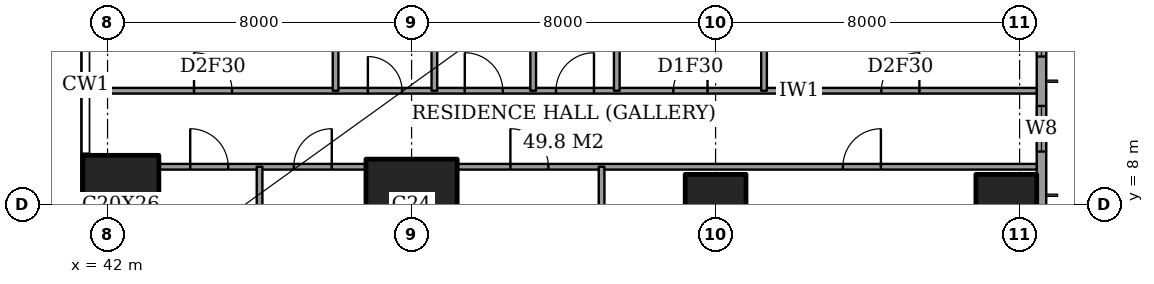
"""IFC4 building model, lengths in metres.
Left out: names, types, materials, properties, quantities, classifications, styles, units other than length and angle.
Written with IfcOpenShell. Run it as: python <this file> out.ifc"""

import sys

from ifc_helpers import new_model, si_unit, direction, frame, frame_2d, origin, origin_2d, place, context, subcontext, project, spatial, rectangle, extrude, element, fill, save


model = new_model("IFC4")
c1 = context("Model", 3, precision=1e-05, world=origin(), true_north=direction((0.0, 1.0)))
c2 = subcontext(c1, "Body", "Model", "MODEL_VIEW")
j1 = project(units=[si_unit("LENGTHUNIT", "METRE"), si_unit("PLANEANGLEUNIT", "RADIAN")], contexts=[c1])
p1 = place(None, origin())
s1 = spatial("IfcSite", under=j1, at=p1, CompositionType="ELEMENT")
p2 = place(p1, origin())
s2 = spatial("IfcBuilding", under=s1, at=p2, CompositionType="ELEMENT")
p3 = place(p2, frame((0.0, 0.0, 230.4)))
s3 = spatial("IfcBuildingStorey", under=s2, at=p3, CompositionType="ELEMENT", Elevation=230.4)
p4 = place(p3, frame((42.35, 8.0, 0.0), z_axis=(0.0, 0.0, 1.0), x_axis=(1.0, 0.0, 0.0)))
e1 = element("IfcColumn", 1, at=p4, inside=s3, PredefinedType="COLUMN", context=c2, shape_type="SweptSolid", body=[
    extrude(rectangle(XDim=2.0, YDim=2.6, at=origin_2d()), origin(), (0.0, 0.0, 1.0), 3.6),
])
p5 = place(p3, frame((50.0, 8.0, 0.0), z_axis=(0.0, 0.0, 1.0), x_axis=(1.0, 0.0, 0.0)))
e2 = element("IfcColumn", 2, at=p5, inside=s3, PredefinedType="COLUMN", context=c2, shape_type="SweptSolid", body=[
    extrude(rectangle(XDim=2.4, YDim=2.4, at=origin_2d()), origin(), (0.0, 0.0, 1.0), 3.6),
])
for number, where, z_axis, x_axis in (
    (3, (58.0, 8.0, 0.0), (0.0, 0.0, 1.0), (1.0, 0.0, 0.0)),
    (4, (65.65, 8.0, 0.0), (0.0, 0.0, 1.0), (1.0, 0.0, 0.0)),
):
    element("IfcColumn", number, at=place(p3, frame(where, z_axis=z_axis, x_axis=x_axis)), inside=s3, PredefinedType="COLUMN", context=c2, shape_type="SweptSolid", body=[
        extrude(rectangle(XDim=1.6, YDim=1.6, at=origin_2d()), origin(), (0.0, 0.0, 1.0), 3.6),
    ])
p6 = place(p3, frame((66.575, 3.175, 0.0), z_axis=(0.0, 0.0, 1.0), x_axis=(0.0, 1.0, 0.0)))
e5 = element("IfcWall", 5, at=p6, inside=s3, PredefinedType="SOLIDWALL", context=c2, shape_type="SweptSolid", body=[
    extrude(rectangle(XDim=41.65, YDim=0.25, at=frame_2d((20.825, 0.0))), origin(), (0.0, 0.0, 1.0), 3.6),
])
p7 = place(p6, frame((0.875, 0.0, 0.6)))
e6 = element("IfcOpeningElement", 6, at=p7, cuts=e5, PredefinedType="OPENING", context=c2, shape_type="SweptSolid", body=[
    extrude(rectangle(XDim=2.4, YDim=2.0, at=frame_2d((1.2, 1.0))), frame((0.0, 0.135, 0.0), z_axis=(0.0, -1.0, 0.0), x_axis=(1.0, 0.0, 0.0)), (0.0, 0.0, 1.0), 0.27),
])
p8 = place(p6, frame((6.225, 0.0, 0.6)))
e7 = element("IfcOpeningElement", 7, at=p8, cuts=e5, PredefinedType="OPENING", context=c2, shape_type="SweptSolid", body=[
    extrude(rectangle(XDim=1.2, YDim=2.0, at=frame_2d((0.6, 1.0))), frame((0.0, 0.135, 0.0), z_axis=(0.0, -1.0, 0.0), x_axis=(1.0, 0.0, 0.0)), (0.0, 0.0, 1.0), 0.27),
])
p9 = place(p6, frame((8.725, 0.0, 0.6)))
e8 = element("IfcOpeningElement", 8, at=p9, cuts=e5, PredefinedType="OPENING", context=c2, shape_type="SweptSolid", body=[
    extrude(rectangle(XDim=2.4, YDim=2.0, at=frame_2d((1.2, 1.0))), frame((0.0, 0.135, 0.0), z_axis=(0.0, -1.0, 0.0), x_axis=(1.0, 0.0, 0.0)), (0.0, 0.0, 1.0), 0.27),
])
p10 = place(p6, frame((15.725, 0.0, 0.6)))
e9 = element("IfcOpeningElement", 9, at=p10, cuts=e5, PredefinedType="OPENING", context=c2, shape_type="SweptSolid", body=[
    extrude(rectangle(XDim=2.4, YDim=2.0, at=frame_2d((1.2, 1.0))), frame((0.0, 0.135, 0.0), z_axis=(0.0, -1.0, 0.0), x_axis=(1.0, 0.0, 0.0)), (0.0, 0.0, 1.0), 0.27),
])
p11 = place(p6, frame((23.525, 0.0, 0.6)))
e10 = element("IfcOpeningElement", 10, at=p11, cuts=e5, PredefinedType="OPENING", context=c2, shape_type="SweptSolid", body=[
    extrude(rectangle(XDim=2.4, YDim=2.0, at=frame_2d((1.2, 1.0))), frame((0.0, 0.135, 0.0), z_axis=(0.0, -1.0, 0.0), x_axis=(1.0, 0.0, 0.0)), (0.0, 0.0, 1.0), 0.27),
])
p12 = place(p6, frame((30.725, 0.0, 0.6)))
e11 = element("IfcOpeningElement", 11, at=p12, cuts=e5, PredefinedType="OPENING", context=c2, shape_type="SweptSolid", body=[
    extrude(rectangle(XDim=2.4, YDim=2.0, at=frame_2d((1.2, 1.0))), frame((0.0, 0.135, 0.0), z_axis=(0.0, -1.0, 0.0), x_axis=(1.0, 0.0, 0.0)), (0.0, 0.0, 1.0), 0.27),
])
p13 = place(p6, frame((34.525, 0.0, 0.6)))
e12 = element("IfcOpeningElement", 12, at=p13, cuts=e5, PredefinedType="OPENING", context=c2, shape_type="SweptSolid", body=[
    extrude(rectangle(XDim=1.2, YDim=2.0, at=frame_2d((0.6, 1.0))), frame((0.0, 0.135, 0.0), z_axis=(0.0, -1.0, 0.0), x_axis=(1.0, 0.0, 0.0)), (0.0, 0.0, 1.0), 0.27),
])
p14 = place(p6, frame((38.375, 0.0, 0.6)))
e13 = element("IfcOpeningElement", 13, at=p14, cuts=e5, PredefinedType="OPENING", context=c2, shape_type="SweptSolid", body=[
    extrude(rectangle(XDim=2.4, YDim=2.0, at=frame_2d((1.2, 1.0))), frame((0.0, 0.135, 0.0), z_axis=(0.0, -1.0, 0.0), x_axis=(1.0, 0.0, 0.0)), (0.0, 0.0, 1.0), 0.27),
])
p15 = place(p3, frame((43.35, 9.0, 0.0), z_axis=(0.0, 0.0, 1.0), x_axis=(1.0, 0.0, 0.0)))
e14 = element("IfcWall", 14, at=p15, inside=s3, PredefinedType="PARTITIONING", context=c2, shape_type="SweptSolid", body=[
    extrude(rectangle(XDim=5.45, YDim=0.15, at=frame_2d((2.725, 0.0))), origin(), (0.0, 0.0, 1.0), 3.35),
])
p16 = place(p15, frame((3.55, 0.0, 0.0)))
e15 = element("IfcOpeningElement", 15, at=p16, cuts=e14, PredefinedType="OPENING", context=c2, shape_type="SweptSolid", body=[
    extrude(rectangle(XDim=1.0, YDim=2.1, at=frame_2d((0.5, 1.05))), frame((0.0, 0.085, 0.0), z_axis=(0.0, -1.0, 0.0), x_axis=(1.0, 0.0, 0.0)), (0.0, 0.0, 1.0), 0.17),
])
p17 = place(p15, frame((0.825, 0.0, 0.0)))
e16 = element("IfcOpeningElement", 16, at=p17, cuts=e14, PredefinedType="OPENING", context=c2, shape_type="SweptSolid", body=[
    extrude(rectangle(XDim=1.0, YDim=2.1, at=frame_2d((0.5, 1.05))), frame((0.0, 0.085, 0.0), z_axis=(0.0, -1.0, 0.0), x_axis=(1.0, 0.0, 0.0)), (0.0, 0.0, 1.0), 0.17),
])
p18 = place(p3, frame((51.2, 9.0, 0.0), z_axis=(0.0, 0.0, 1.0), x_axis=(1.0, 0.0, 0.0)))
e17 = element("IfcWall", 17, at=p18, inside=s3, PredefinedType="PARTITIONING", context=c2, shape_type="SweptSolid", body=[
    extrude(rectangle(XDim=15.25, YDim=0.15, at=frame_2d((7.625, 0.0))), origin(), (0.0, 0.0, 1.0), 3.35),
])
p19 = place(p18, frame((10.15, 0.0, 0.0)))
e18 = element("IfcOpeningElement", 18, at=p19, cuts=e17, PredefinedType="OPENING", context=c2, shape_type="SweptSolid", body=[
    extrude(rectangle(XDim=1.0, YDim=2.1, at=frame_2d((0.5, 1.05))), frame((0.0, 0.085, 0.0), z_axis=(0.0, -1.0, 0.0), x_axis=(1.0, 0.0, 0.0)), (0.0, 0.0, 1.0), 0.17),
])
p20 = place(p18, frame((1.4, 0.0, 0.0)))
e19 = element("IfcOpeningElement", 19, at=p20, cuts=e17, PredefinedType="OPENING", context=c2, shape_type="SweptSolid", body=[
    extrude(rectangle(XDim=1.0, YDim=2.1, at=frame_2d((0.5, 1.05))), frame((0.0, 0.085, 0.0), z_axis=(0.0, -1.0, 0.0), x_axis=(1.0, 0.0, 0.0)), (0.0, 0.0, 1.0), 0.17),
])
p21 = place(p3, frame((41.439, 11.0, 0.0), z_axis=(0.0, 0.0, 1.0), x_axis=(1.0, 0.0, 0.0)))
e20 = element("IfcWall", 20, at=p21, inside=s3, PredefinedType="PARTITIONING", context=c2, shape_type="SweptSolid", body=[
    extrude(rectangle(XDim=25.011, YDim=0.15, at=frame_2d((12.505, 0.0))), origin(), (0.0, 0.0, 1.0), 3.35),
])
p22 = place(p21, frame((12.361, 0.0, 0.0)))
e21 = element("IfcOpeningElement", 21, at=p22, cuts=e20, PredefinedType="OPENING", context=c2, shape_type="SweptSolid", body=[
    extrude(rectangle(XDim=1.0, YDim=2.1, at=frame_2d((0.5, 1.05))), frame((0.0, 0.085, 0.0), z_axis=(0.0, -1.0, 0.0), x_axis=(1.0, 0.0, 0.0)), (0.0, 0.0, 1.0), 0.17),
])
p23 = place(p21, frame((20.924, 0.0, 0.0)))
e22 = element("IfcOpeningElement", 22, at=p23, cuts=e20, PredefinedType="OPENING", context=c2, shape_type="SweptSolid", body=[
    extrude(rectangle(XDim=1.0, YDim=2.1, at=frame_2d((0.5, 1.05))), frame((0.0, 0.085, 0.0), z_axis=(0.0, -1.0, 0.0), x_axis=(1.0, 0.0, 0.0)), (0.0, 0.0, 1.0), 0.17),
])
p24 = place(p21, frame((15.448, 0.0, 0.0)))
e23 = element("IfcOpeningElement", 23, at=p24, cuts=e20, PredefinedType="OPENING", context=c2, shape_type="SweptSolid", body=[
    extrude(rectangle(XDim=0.9, YDim=2.1, at=frame_2d((0.45, 1.05))), frame((0.0, 0.085, 0.0), z_axis=(0.0, -1.0, 0.0), x_axis=(1.0, 0.0, 0.0)), (0.0, 0.0, 1.0), 0.17),
])
p25 = place(p21, frame((9.961, 0.0, 0.0)))
e24 = element("IfcOpeningElement", 24, at=p25, cuts=e20, PredefinedType="OPENING", context=c2, shape_type="SweptSolid", body=[
    extrude(rectangle(XDim=1.0, YDim=2.1, at=frame_2d((0.5, 1.05))), frame((0.0, 0.085, 0.0), z_axis=(0.0, -1.0, 0.0), x_axis=(1.0, 0.0, 0.0)), (0.0, 0.0, 1.0), 0.17),
])
p26 = place(p21, frame((7.411, 0.0, 0.0)))
e25 = element("IfcOpeningElement", 25, at=p26, cuts=e20, PredefinedType="OPENING", context=c2, shape_type="SweptSolid", body=[
    extrude(rectangle(XDim=0.9, YDim=2.1, at=frame_2d((0.45, 1.05))), frame((0.0, 0.085, 0.0), z_axis=(0.0, -1.0, 0.0), x_axis=(1.0, 0.0, 0.0)), (0.0, 0.0, 1.0), 0.17),
])
p27 = place(p21, frame((2.836, 0.0, 0.0)))
e26 = element("IfcOpeningElement", 26, at=p27, cuts=e20, PredefinedType="OPENING", context=c2, shape_type="SweptSolid", body=[
    extrude(rectangle(XDim=1.0, YDim=2.1, at=frame_2d((0.5, 1.05))), frame((0.0, 0.085, 0.0), z_axis=(0.0, -1.0, 0.0), x_axis=(1.0, 0.0, 0.0)), (0.0, 0.0, 1.0), 0.17),
])
p28 = place(p3, frame((46.0, -0.45, 0.0), z_axis=(0.0, 0.0, 1.0), x_axis=(0.0, 1.0, 0.0)))
e27 = element("IfcWall", 27, at=p28, inside=s3, PredefinedType="PARTITIONING", context=c2, shape_type="SweptSolid", body=[
    extrude(rectangle(XDim=9.45, YDim=0.15, at=frame_2d((4.725, 0.0))), origin(), (0.0, 0.0, 1.0), 3.35),
])
p29 = place(p3, frame((48.0, 11.0, 0.0), z_axis=(0.0, 0.0, 1.0), x_axis=(0.0, 1.0, 0.0)))
e28 = element("IfcWall", 28, at=p29, inside=s3, PredefinedType="PARTITIONING", context=c2, shape_type="SweptSolid", body=[
    extrude(rectangle(XDim=6.5, YDim=0.15, at=frame_2d((3.25, 0.0))), origin(), (0.0, 0.0, 1.0), 3.35),
])
p30 = place(p3, frame((50.6, 11.0, 0.0), z_axis=(0.0, 0.0, 1.0), x_axis=(0.0, 1.0, 0.0)))
e29 = element("IfcWall", 29, at=p30, inside=s3, PredefinedType="PARTITIONING", context=c2, shape_type="SweptSolid", body=[
    extrude(rectangle(XDim=3.8, YDim=0.15, at=frame_2d((1.9, 0.0))), origin(), (0.0, 0.0, 1.0), 3.35),
])
p31 = place(p3, frame((53.2, 11.0, 0.0), z_axis=(0.0, 0.0, 1.0), x_axis=(0.0, 1.0, 0.0)))
e30 = element("IfcWall", 30, at=p31, inside=s3, PredefinedType="PARTITIONING", context=c2, shape_type="SweptSolid", body=[
    extrude(rectangle(XDim=6.5, YDim=0.15, at=frame_2d((3.25, 0.0))), origin(), (0.0, 0.0, 1.0), 3.35),
])
p32 = place(p3, frame((55.0, -0.45, 0.0), z_axis=(0.0, 0.0, 1.0), x_axis=(0.0, 1.0, 0.0)))
e31 = element("IfcWall", 31, at=p32, inside=s3, PredefinedType="PARTITIONING", context=c2, shape_type="SweptSolid", body=[
    extrude(rectangle(XDim=9.45, YDim=0.15, at=frame_2d((4.725, 0.0))), origin(), (0.0, 0.0, 1.0), 3.35),
])
p33 = place(p3, frame((55.4, 11.0, 0.0), z_axis=(0.0, 0.0, 1.0), x_axis=(0.0, 1.0, 0.0)))
e32 = element("IfcWall", 32, at=p33, inside=s3, PredefinedType="PARTITIONING", context=c2, shape_type="SweptSolid", body=[
    extrude(rectangle(XDim=10.6, YDim=0.15, at=frame_2d((5.3, 0.0))), origin(), (0.0, 0.0, 1.0), 3.35),
])
p34 = place(p33, frame((8.05, 0.0, 0.0)))
e33 = element("IfcOpeningElement", 33, at=p34, cuts=e32, PredefinedType="OPENING", context=c2, shape_type="SweptSolid", body=[
    extrude(rectangle(XDim=1.0, YDim=2.1, at=frame_2d((0.5, 1.05))), frame((0.0, 0.085, 0.0), z_axis=(0.0, -1.0, 0.0), x_axis=(1.0, 0.0, 0.0)), (0.0, 0.0, 1.0), 0.17),
])
p35 = place(p3, frame((59.275, 11.0, 0.0), z_axis=(0.0, 0.0, 1.0), x_axis=(0.0, 1.0, 0.0)))
e34 = element("IfcWall", 34, at=p35, inside=s3, PredefinedType="PARTITIONING", context=c2, shape_type="SweptSolid", body=[
    extrude(rectangle(XDim=3.8, YDim=0.15, at=frame_2d((1.9, 0.0))), origin(), (0.0, 0.0, 1.0), 3.35),
])
p36 = place(p8, origin())
e35 = element("IfcWindow", 35, at=p36, inside=s3, PartitioningType="SINGLE_PANEL", PredefinedType="WINDOW", context=c2, shape_type="SweptSolid", body=[
    extrude(rectangle(XDim=1.2, YDim=2.0, at=frame_2d((0.6, 1.0))), frame((0.0, 0.03, 0.0), z_axis=(0.0, -1.0, 0.0), x_axis=(1.0, 0.0, 0.0)), (0.0, 0.0, 1.0), 0.06),
])
fill(e7, e35)
p37 = place(p9, origin())
e36 = element("IfcWindow", 36, at=p37, inside=s3, PartitioningType="SINGLE_PANEL", PredefinedType="WINDOW", context=c2, shape_type="SweptSolid", body=[
    extrude(rectangle(XDim=2.4, YDim=2.0, at=frame_2d((1.2, 1.0))), frame((0.0, 0.03, 0.0), z_axis=(0.0, -1.0, 0.0), x_axis=(1.0, 0.0, 0.0)), (0.0, 0.0, 1.0), 0.06),
])
fill(e8, e36)
p38 = place(p19, origin())
e37 = element("IfcDoor", 37, at=p38, inside=s3, OperationType="SINGLE_SWING_LEFT", PredefinedType="DOOR", context=c2, shape_type="SweptSolid", body=[
    extrude(rectangle(XDim=1.0, YDim=2.1, at=frame_2d((0.5, 1.05))), frame((0.0, 0.025, 0.0), z_axis=(0.0, -1.0, 0.0), x_axis=(1.0, 0.0, 0.0)), (0.0, 0.0, 1.0), 0.05),
])
fill(e18, e37)
p39 = place(p20, origin())
e38 = element("IfcDoor", 38, at=p39, inside=s3, OperationType="SINGLE_SWING_RIGHT", PredefinedType="DOOR", context=c2, shape_type="SweptSolid", body=[
    extrude(rectangle(XDim=1.0, YDim=2.1, at=frame_2d((0.5, 1.05))), frame((0.0, 0.025, 0.0), z_axis=(0.0, -1.0, 0.0), x_axis=(1.0, 0.0, 0.0)), (0.0, 0.0, 1.0), 0.05),
])
fill(e19, e38)
p40 = place(p16, origin())
e39 = element("IfcDoor", 39, at=p40, inside=s3, OperationType="SINGLE_SWING_LEFT", PredefinedType="DOOR", context=c2, shape_type="SweptSolid", body=[
    extrude(rectangle(XDim=1.0, YDim=2.1, at=frame_2d((0.5, 1.05))), frame((0.0, 0.025, 0.0), z_axis=(0.0, -1.0, 0.0), x_axis=(1.0, 0.0, 0.0)), (0.0, 0.0, 1.0), 0.05),
])
fill(e15, e39)
p41 = place(p17, origin())
e40 = element("IfcDoor", 40, at=p41, inside=s3, OperationType="SINGLE_SWING_RIGHT", PredefinedType="DOOR", context=c2, shape_type="SweptSolid", body=[
    extrude(rectangle(XDim=1.0, YDim=2.1, at=frame_2d((0.5, 1.05))), frame((0.0, 0.025, 0.0), z_axis=(0.0, -1.0, 0.0), x_axis=(1.0, 0.0, 0.0)), (0.0, 0.0, 1.0), 0.05),
])
fill(e16, e40)
p42 = place(p22, origin())
e41 = element("IfcDoor", 41, at=p42, inside=s3, OperationType="SINGLE_SWING_LEFT", PredefinedType="DOOR", context=c2, shape_type="SweptSolid", body=[
    extrude(rectangle(XDim=1.0, YDim=2.1, at=frame_2d((0.5, 1.05))), frame((0.0, 0.025, 0.0), z_axis=(0.0, -1.0, 0.0), x_axis=(1.0, 0.0, 0.0)), (0.0, 0.0, 1.0), 0.05),
])
fill(e21, e41)
p43 = place(p23, origin())
e42 = element("IfcDoor", 42, at=p43, inside=s3, OperationType="SINGLE_SWING_LEFT", PredefinedType="DOOR", context=c2, shape_type="SweptSolid", body=[
    extrude(rectangle(XDim=1.0, YDim=2.1, at=frame_2d((0.5, 1.05))), frame((0.0, 0.025, 0.0), z_axis=(0.0, -1.0, 0.0), x_axis=(1.0, 0.0, 0.0)), (0.0, 0.0, 1.0), 0.05),
])
fill(e22, e42)
p44 = place(p24, origin())
e43 = element("IfcDoor", 43, at=p44, inside=s3, OperationType="SINGLE_SWING_LEFT", PredefinedType="DOOR", context=c2, shape_type="SweptSolid", body=[
    extrude(rectangle(XDim=0.9, YDim=2.1, at=frame_2d((0.45, 1.05))), frame((0.0, 0.025, 0.0), z_axis=(0.0, -1.0, 0.0), x_axis=(1.0, 0.0, 0.0)), (0.0, 0.0, 1.0), 0.05),
])
fill(e23, e43)
p45 = place(p25, origin())
e44 = element("IfcDoor", 44, at=p45, inside=s3, OperationType="SINGLE_SWING_RIGHT", PredefinedType="DOOR", context=c2, shape_type="SweptSolid", body=[
    extrude(rectangle(XDim=1.0, YDim=2.1, at=frame_2d((0.5, 1.05))), frame((0.0, 0.025, 0.0), z_axis=(0.0, -1.0, 0.0), x_axis=(1.0, 0.0, 0.0)), (0.0, 0.0, 1.0), 0.05),
])
fill(e24, e44)
p46 = place(p26, origin())
e45 = element("IfcDoor", 45, at=p46, inside=s3, OperationType="SINGLE_SWING_RIGHT", PredefinedType="DOOR", context=c2, shape_type="SweptSolid", body=[
    extrude(rectangle(XDim=0.9, YDim=2.1, at=frame_2d((0.45, 1.05))), frame((0.0, 0.025, 0.0), z_axis=(0.0, -1.0, 0.0), x_axis=(1.0, 0.0, 0.0)), (0.0, 0.0, 1.0), 0.05),
])
fill(e25, e45)
p47 = place(p27, origin())
e46 = element("IfcDoor", 46, at=p47, inside=s3, OperationType="SINGLE_SWING_RIGHT", PredefinedType="DOOR", context=c2, shape_type="SweptSolid", body=[
    extrude(rectangle(XDim=1.0, YDim=2.1, at=frame_2d((0.5, 1.05))), frame((0.0, 0.025, 0.0), z_axis=(0.0, -1.0, 0.0), x_axis=(1.0, 0.0, 0.0)), (0.0, 0.0, 1.0), 0.05),
])
fill(e26, e46)
save(model, sys.argv[1])
